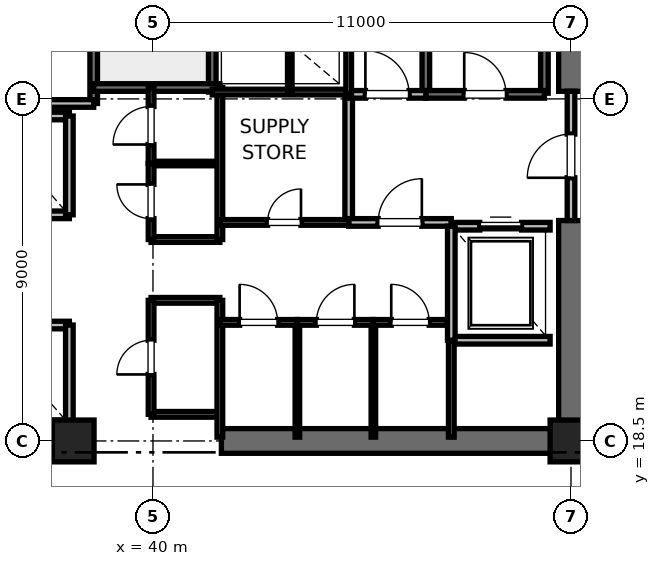
"""IFC4 building model, lengths in metres.
Left out: names, types, materials, properties, quantities, classifications, styles, units other than length and angle.
Written with IfcOpenShell. Run it as: python <this file> out.ifc"""

import sys

from ifc_helpers import new_model, si_unit, direction, frame, frame_2d, origin, origin_2d, place, context, subcontext, project, spatial, rectangle, extrude, element, fill, save


model = new_model("IFC4")
c1 = context("Model", 3, precision=1e-05, world=origin(), true_north=direction((0.0, 1.0)))
c2 = subcontext(c1, "Body", "Model", "MODEL_VIEW")
j1 = project(units=[si_unit("LENGTHUNIT", "METRE"), si_unit("PLANEANGLEUNIT", "RADIAN")], contexts=[c1])
p1 = place(None, origin())
s1 = spatial("IfcSite", under=j1, at=p1, CompositionType="ELEMENT")
p2 = place(p1, origin())
s2 = spatial("IfcBuilding", under=s1, at=p2, CompositionType="ELEMENT")
p3 = place(p2, frame((0.0, 0.0, 11.2)))
s3 = spatial("IfcBuildingStorey", under=s2, at=p3, CompositionType="ELEMENT", Elevation=11.2)
for number, where, z_axis, x_axis in (
    (1, (51.0, 18.5, 0.0), (0.0, 0.0, 1.0), (1.0, 0.0, 0.0)),
    (2, (37.9, 18.5, 0.0), (0.0, 0.0, 1.0), (1.0, 0.0, 0.0)),
):
    element("IfcColumn", number, at=place(p3, frame(where, z_axis=z_axis, x_axis=x_axis)), inside=s3, PredefinedType="PILASTER", context=c2, shape_type="SweptSolid", body=[
        extrude(rectangle(XDim=1.1, YDim=1.1, at=origin_2d()), origin(), (0.0, 0.0, 1.0), 5.2),
    ])
for number, where, z_axis, x_axis in (
    (3, (29.0, 18.5, 0.0), (0.0, 0.0, 1.0), (1.0, 0.0, 0.0)),
    (4, (41.8, 18.5, 0.0), (0.0, 0.0, 1.0), (1.0, 0.0, 0.0)),
):
    element("IfcWall", number, at=place(p3, frame(where, z_axis=z_axis, x_axis=x_axis)), inside=s3, PredefinedType="SHEAR", context=c2, shape_type="SweptSolid", body=[
        extrude(rectangle(XDim=9.2, YDim=0.65, at=frame_2d((4.6, 0.0))), origin(), (0.0, 0.0, 1.0), 4.92),
    ])
p4 = place(p3, frame((51.0, 18.5, 0.0), z_axis=(0.0, 0.0, 1.0), x_axis=(0.0, 1.0, 0.0)))
e5 = element("IfcWall", 5, at=p4, inside=s3, PredefinedType="SHEAR", context=c2, shape_type="SweptSolid", body=[
    extrude(rectangle(XDim=5.8, YDim=0.65, at=frame_2d((2.9, 0.0))), origin(), (0.0, 0.0, 1.0), 4.92),
])
p5 = place(p3, frame((51.0, 27.7, 0.0), z_axis=(0.0, 0.0, 1.0), x_axis=(0.0, 1.0, 0.0)))
e6 = element("IfcWall", 6, at=p5, inside=s3, PredefinedType="SHEAR", context=c2, shape_type="SweptSolid", body=[
    extrude(rectangle(XDim=8.8, YDim=0.65, at=frame_2d((4.4, 0.0))), origin(), (0.0, 0.0, 1.0), 4.92),
])
p6 = place(p3, frame((50.3, 27.65, 0.0), z_axis=(0.0, 0.0, 1.0), x_axis=(0.0, 1.0, 0.0)))
e7 = element("IfcWall", 7, at=p6, inside=s3, PredefinedType="SOLIDWALL", context=c2, shape_type="SweptSolid", body=[
    extrude(rectangle(XDim=8.15, YDim=0.2, at=frame_2d((4.075, 0.0))), origin(), (0.0, 0.0, 1.0), 4.92),
])
p7 = place(p3, frame((47.18, 27.62, 0.0), z_axis=(0.0, 0.0, 1.0), x_axis=(0.0, 1.0, 0.0)))
e8 = element("IfcWall", 8, at=p7, inside=s3, PredefinedType="SOLIDWALL", context=c2, shape_type="SweptSolid", body=[
    extrude(rectangle(XDim=8.18, YDim=0.2, at=frame_2d((4.09, 0.0))), origin(), (0.0, 0.0, 1.0), 4.92),
])
p8 = place(p3, frame((47.18, 27.62, 0.0), z_axis=(0.0, 0.0, 1.0), x_axis=(1.0, 0.0, 0.0)))
e9 = element("IfcWall", 9, at=p8, inside=s3, PredefinedType="SOLIDWALL", context=c2, shape_type="SweptSolid", body=[
    extrude(rectangle(XDim=3.12, YDim=0.2, at=frame_2d((1.56, 0.0))), origin(), (0.0, 0.0, 1.0), 4.92),
])
p9 = place(p8, frame((1.01, 0.0, 0.0)))
e10 = element("IfcOpeningElement", 10, at=p9, cuts=e9, PredefinedType="OPENING", context=c2, shape_type="SweptSolid", body=[
    extrude(rectangle(XDim=1.1, YDim=2.15, at=frame_2d((0.55, 1.075))), frame((0.0, 0.1, 0.0), z_axis=(0.0, -1.0, 0.0), x_axis=(1.0, 0.0, 0.0)), (0.0, 0.0, 1.0), 0.2),
])
p10 = place(p3, frame((38.44, 27.38, 0.0), z_axis=(0.0, 0.0, 1.0), x_axis=(0.0, 1.0, 0.0)))
e11 = element("IfcWall", 11, at=p10, inside=s3, PredefinedType="SOLIDWALL", context=c2, shape_type="SweptSolid", body=[
    extrude(rectangle(XDim=8.87, YDim=0.2, at=frame_2d((4.435, 0.0))), origin(), (0.0, 0.0, 1.0), 4.92),
])
p11 = place(p3, frame((41.56, 27.68, 0.0), z_axis=(0.0, 0.0, 1.0), x_axis=(0.0, 1.0, 0.0)))
e12 = element("IfcWall", 12, at=p11, inside=s3, PredefinedType="SOLIDWALL", context=c2, shape_type="SweptSolid", body=[
    extrude(rectangle(XDim=8.57, YDim=0.2, at=frame_2d((4.285, 0.0))), origin(), (0.0, 0.0, 1.0), 4.92),
])
p12 = place(p3, frame((38.44, 27.8, 0.0), z_axis=(0.0, 0.0, 1.0), x_axis=(1.0, 0.0, 0.0)))
e13 = element("IfcWall", 13, at=p12, inside=s3, PredefinedType="SOLIDWALL", context=c2, shape_type="SweptSolid", body=[
    extrude(rectangle(XDim=3.32, YDim=0.2, at=frame_2d((1.66, 0.0))), origin(), (0.0, 0.0, 1.0), 4.92),
])
p13 = place(p3, frame((32.82, 27.38, 0.0), z_axis=(0.0, 0.0, 1.0), x_axis=(1.0, 0.0, 0.0)))
e14 = element("IfcWall", 14, at=p13, inside=s3, PredefinedType="PARTITIONING", context=c2, shape_type="SweptSolid", body=[
    extrude(rectangle(XDim=5.62, YDim=0.2, at=frame_2d((2.81, 0.0))), origin(), (0.0, 0.0, 1.0), 4.92),
])
p14 = place(p3, frame((45.15, 24.25, 0.0), z_axis=(0.0, 0.0, 1.0), x_axis=(0.0, 1.0, 0.0)))
e15 = element("IfcWall", 15, at=p14, inside=s3, PredefinedType="PARTITIONING", context=c2, shape_type="SweptSolid", body=[
    extrude(rectangle(XDim=3.37, YDim=0.2, at=frame_2d((1.685, 0.0))), origin(), (0.0, 0.0, 1.0), 4.92),
])
p15 = place(p3, frame((45.15, 24.25, 0.0), z_axis=(0.0, 0.0, 1.0), x_axis=(1.0, 0.0, 0.0)))
e16 = element("IfcWall", 16, at=p15, inside=s3, PredefinedType="PARTITIONING", context=c2, shape_type="SweptSolid", body=[
    extrude(rectangle(XDim=2.7, YDim=0.2, at=frame_2d((1.35, 0.0))), origin(), (0.0, 0.0, 1.0), 4.92),
])
p16 = place(p15, frame((0.775, 0.0, 0.0)))
e17 = element("IfcOpeningElement", 17, at=p16, cuts=e16, PredefinedType="OPENING", context=c2, shape_type="SweptSolid", body=[
    extrude(rectangle(XDim=1.15, YDim=2.2, at=frame_2d((0.575, 1.1))), frame((0.0, 0.1, 0.0), z_axis=(0.0, -1.0, 0.0), x_axis=(1.0, 0.0, 0.0)), (0.0, 0.0, 1.0), 0.2),
])
p17 = place(p3, frame((45.15, 27.62, 0.0), z_axis=(0.0, 0.0, 1.0), x_axis=(1.0, 0.0, 0.0)))
e18 = element("IfcWall", 18, at=p17, inside=s3, PredefinedType="PARTITIONING", context=c2, shape_type="SweptSolid", body=[
    extrude(rectangle(XDim=2.03, YDim=0.2, at=frame_2d((1.015, 0.0))), origin(), (0.0, 0.0, 1.0), 4.92),
])
p18 = place(p17, frame((0.44, 0.0, 0.0)))
e19 = element("IfcOpeningElement", 19, at=p18, cuts=e18, PredefinedType="OPENING", context=c2, shape_type="SweptSolid", body=[
    extrude(rectangle(XDim=1.15, YDim=2.2, at=frame_2d((0.575, 1.1))), frame((0.0, 0.1, 0.0), z_axis=(0.0, -1.0, 0.0), x_axis=(1.0, 0.0, 0.0)), (0.0, 0.0, 1.0), 0.2),
])
p19 = place(p3, frame((51.0, 24.3, 0.0), z_axis=(0.0, 0.0, 1.0), x_axis=(0.0, 1.0, 0.0)))
e20 = element("IfcWall", 20, at=p19, inside=s3, PredefinedType="PARTITIONING", context=c2, shape_type="SweptSolid", body=[
    extrude(rectangle(XDim=3.4, YDim=0.2, at=frame_2d((1.7, 0.0))), origin(), (0.0, 0.0, 1.0), 3.7),
])
p20 = place(p19, frame((1.125, 0.0, 0.0)))
e21 = element("IfcOpeningElement", 21, at=p20, cuts=e20, PredefinedType="OPENING", context=c2, shape_type="SweptSolid", body=[
    extrude(rectangle(XDim=1.15, YDim=2.2, at=frame_2d((0.575, 1.1))), frame((0.0, 0.1, 0.0), z_axis=(0.0, -1.0, 0.0), x_axis=(1.0, 0.0, 0.0)), (0.0, 0.0, 1.0), 0.2),
])
p21 = place(p3, frame((47.85, 21.15, 0.0), z_axis=(0.0, 0.0, 1.0), x_axis=(1.0, 0.0, 0.0)))
e22 = element("IfcWall", 22, at=p21, inside=s3, PredefinedType="SOLIDWALL", context=c2, shape_type="SweptSolid", body=[
    extrude(rectangle(XDim=2.6, YDim=0.2, at=frame_2d((1.3, 0.0))), origin(), (0.0, 0.0, 1.0), 4.92),
])
p22 = place(p3, frame((50.45, 24.15, 0.0), z_axis=(0.0, 0.0, 1.0), x_axis=(-1.0, 0.0, 0.0)))
e23 = element("IfcWall", 23, at=p22, inside=s3, PredefinedType="SOLIDWALL", context=c2, shape_type="SweptSolid", body=[
    extrude(rectangle(XDim=2.6, YDim=0.2, at=frame_2d((1.3, 0.0))), origin(), (0.0, 0.0, 1.0), 3.7),
])
p23 = place(p22, frame((0.75, 0.0, 0.0)))
e24 = element("IfcOpeningElement", 24, at=p23, cuts=e23, PredefinedType="OPENING", context=c2, shape_type="SweptSolid", body=[
    extrude(rectangle(XDim=1.1, YDim=2.2, at=frame_2d((0.55, 1.1))), frame((0.0, 0.1, 0.0), z_axis=(0.0, -1.0, 0.0), x_axis=(1.0, 0.0, 0.0)), (0.0, 0.0, 1.0), 0.2),
])
p24 = place(p3, frame((47.85, 24.15, 0.0), z_axis=(0.0, 0.0, 1.0), x_axis=(0.0, -1.0, 0.0)))
e25 = element("IfcWall", 25, at=p24, inside=s3, PredefinedType="SOLIDWALL", context=c2, shape_type="SweptSolid", body=[
    extrude(rectangle(XDim=3.0, YDim=0.2, at=frame_2d((1.5, 0.0))), origin(), (0.0, 0.0, 1.0), 4.92),
])
p25 = place(p3, frame((35.5, 18.95, 0.0), z_axis=(0.0, 0.0, 1.0), x_axis=(1.0, 0.0, 0.0)))
e26 = element("IfcWall", 26, at=p25, inside=s3, PredefinedType="SOLIDWALL", context=c2, shape_type="SweptSolid", body=[
    extrude(rectangle(XDim=2.3, YDim=0.2, at=frame_2d((1.15, 0.0))), origin(), (0.0, 0.0, 1.0), 3.7),
])
p26 = place(p3, frame((37.8, 21.55, 0.0), z_axis=(0.0, 0.0, 1.0), x_axis=(-1.0, 0.0, 0.0)))
e27 = element("IfcWall", 27, at=p26, inside=s3, PredefinedType="SOLIDWALL", context=c2, shape_type="SweptSolid", body=[
    extrude(rectangle(XDim=2.3, YDim=0.2, at=frame_2d((1.15, 0.0))), origin(), (0.0, 0.0, 1.0), 4.92),
])
p27 = place(p3, frame((37.8, 18.95, 0.0), z_axis=(0.0, 0.0, 1.0), x_axis=(0.0, 1.0, 0.0)))
e28 = element("IfcWall", 28, at=p27, inside=s3, PredefinedType="SOLIDWALL", context=c2, shape_type="SweptSolid", body=[
    extrude(rectangle(XDim=2.6, YDim=0.2, at=frame_2d((1.3, 0.0))), origin(), (0.0, 0.0, 1.0), 3.7),
])
for number, where, z_axis, x_axis in (
    (29, (35.5, 24.45, 0.0), (0.0, 0.0, 1.0), (1.0, 0.0, 0.0)),
    (30, (37.8, 27.05, 0.0), (0.0, 0.0, 1.0), (-1.0, 0.0, 0.0)),
):
    element("IfcWall", number, at=place(p3, frame(where, z_axis=z_axis, x_axis=x_axis)), inside=s3, PredefinedType="SOLIDWALL", context=c2, shape_type="SweptSolid", body=[
        extrude(rectangle(XDim=2.3, YDim=0.2, at=frame_2d((1.15, 0.0))), origin(), (0.0, 0.0, 1.0), 4.92),
    ])
p28 = place(p3, frame((37.8, 24.45, 0.0), z_axis=(0.0, 0.0, 1.0), x_axis=(0.0, 1.0, 0.0)))
e31 = element("IfcWall", 31, at=p28, inside=s3, PredefinedType="SOLIDWALL", context=c2, shape_type="SweptSolid", body=[
    extrude(rectangle(XDim=2.6, YDim=0.2, at=frame_2d((1.3, 0.0))), origin(), (0.0, 0.0, 1.0), 4.92),
])
for number, where, z_axis, x_axis in (
    (32, (39.95, 19.2, 0.0), (0.0, 0.0, 1.0), (1.0, 0.0, 0.0)),
    (33, (39.95, 22.2, 0.0), (0.0, 0.0, 1.0), (1.0, 0.0, 0.0)),
    (34, (39.95, 23.8, 0.0), (0.0, 0.0, 1.0), (1.0, 0.0, 0.0)),
):
    element("IfcWall", number, at=place(p3, frame(where, z_axis=z_axis, x_axis=x_axis)), inside=s3, PredefinedType="PARTITIONING", context=c2, shape_type="SweptSolid", body=[
        extrude(rectangle(XDim=1.81, YDim=0.15, at=frame_2d((0.905, 0.0))), origin(), (0.0, 0.0, 1.0), 2.85),
    ])
p29 = place(p3, frame((39.95, 25.8, 0.0), z_axis=(0.0, 0.0, 1.0), x_axis=(1.0, 0.0, 0.0)))
e35 = element("IfcWall", 35, at=p29, inside=s3, PredefinedType="PARTITIONING", context=c2, shape_type="SweptSolid", body=[
    extrude(rectangle(XDim=1.81, YDim=0.12, at=frame_2d((0.905, 0.0))), origin(), (0.0, 0.0, 1.0), 2.85),
])
p30 = place(p3, frame((41.76, 18.6, 0.0), z_axis=(0.0, 0.0, 1.0), x_axis=(0.0, 1.0, 0.0)))
e36 = element("IfcWall", 36, at=p30, inside=s3, PredefinedType="PARTITIONING", context=c2, shape_type="SweptSolid", body=[
    extrude(rectangle(XDim=3.6, YDim=0.15, at=frame_2d((1.8, 0.0))), origin(), (0.0, 0.0, 1.0), 2.85),
])
p31 = place(p3, frame((41.76, 23.8, 0.0), z_axis=(0.0, 0.0, 1.0), x_axis=(0.0, 1.0, 0.0)))
e37 = element("IfcWall", 37, at=p31, inside=s3, PredefinedType="PARTITIONING", context=c2, shape_type="SweptSolid", body=[
    extrude(rectangle(XDim=4.0, YDim=0.15, at=frame_2d((2.0, 0.0))), origin(), (0.0, 0.0, 1.0), 2.85),
])
p32 = place(p3, frame((39.95, 19.2, 0.0), z_axis=(0.0, 0.0, 1.0), x_axis=(0.0, 1.0, 0.0)))
e38 = element("IfcWall", 38, at=p32, inside=s3, PredefinedType="PARTITIONING", context=c2, shape_type="SweptSolid", body=[
    extrude(rectangle(XDim=3.0, YDim=0.15, at=frame_2d((1.5, 0.0))), origin(), (0.0, 0.0, 1.0), 2.85),
])
p33 = place(p32, frame((1.05, 0.0, 0.0)))
e39 = element("IfcOpeningElement", 39, at=p33, cuts=e38, PredefinedType="OPENING", context=c2, shape_type="SweptSolid", body=[
    extrude(rectangle(XDim=0.9, YDim=2.1, at=frame_2d((0.45, 1.05))), frame((0.0, 0.075, 0.0), z_axis=(0.0, -1.0, 0.0), x_axis=(1.0, 0.0, 0.0)), (0.0, 0.0, 1.0), 0.15),
])
p34 = place(p3, frame((39.95, 23.8, 0.0), z_axis=(0.0, 0.0, 1.0), x_axis=(0.0, 1.0, 0.0)))
e40 = element("IfcWall", 40, at=p34, inside=s3, PredefinedType="PARTITIONING", context=c2, shape_type="SweptSolid", body=[
    extrude(rectangle(XDim=2.0, YDim=0.15, at=frame_2d((1.0, 0.0))), origin(), (0.0, 0.0, 1.0), 2.85),
])
p35 = place(p34, frame((0.55, 0.0, 0.0)))
e41 = element("IfcOpeningElement", 41, at=p35, cuts=e40, PredefinedType="OPENING", context=c2, shape_type="SweptSolid", body=[
    extrude(rectangle(XDim=0.9, YDim=2.1, at=frame_2d((0.45, 1.05))), frame((0.0, 0.075, 0.0), z_axis=(0.0, -1.0, 0.0), x_axis=(1.0, 0.0, 0.0)), (0.0, 0.0, 1.0), 0.15),
])
p36 = place(p3, frame((39.95, 25.8, 0.0), z_axis=(0.0, 0.0, 1.0), x_axis=(0.0, 1.0, 0.0)))
e42 = element("IfcWall", 42, at=p36, inside=s3, PredefinedType="PARTITIONING", context=c2, shape_type="SweptSolid", body=[
    extrude(rectangle(XDim=2.0, YDim=0.15, at=frame_2d((1.0, 0.0))), origin(), (0.0, 0.0, 1.0), 2.85),
])
p37 = place(p36, frame((0.5, 0.0, 0.0)))
e43 = element("IfcOpeningElement", 43, at=p37, cuts=e42, PredefinedType="OPENING", context=c2, shape_type="SweptSolid", body=[
    extrude(rectangle(XDim=1.0, YDim=2.15, at=frame_2d((0.5, 1.075))), frame((0.0, 0.075, 0.0), z_axis=(0.0, -1.0, 0.0), x_axis=(1.0, 0.0, 0.0)), (0.0, 0.0, 1.0), 0.15),
])
p38 = place(p3, frame((41.56, 27.68, 0.0), z_axis=(0.0, 0.0, 1.0), x_axis=(1.0, 0.0, 0.0)))
e44 = element("IfcWall", 44, at=p38, inside=s3, PredefinedType="PARTITIONING", context=c2, shape_type="SweptSolid", body=[
    extrude(rectangle(XDim=3.59, YDim=0.15, at=frame_2d((1.795, 0.0))), origin(), (0.0, 0.0, 1.0), 2.85),
])
p39 = place(p3, frame((47.85, 18.6, 0.0), z_axis=(0.0, 0.0, 1.0), x_axis=(0.0, 1.0, 0.0)))
e45 = element("IfcWall", 45, at=p39, inside=s3, PredefinedType="PARTITIONING", context=c2, shape_type="SweptSolid", body=[
    extrude(rectangle(XDim=2.54, YDim=0.15, at=frame_2d((1.27, 0.0))), origin(), (0.0, 0.0, 1.0), 2.85),
])
for number, where, z_axis, x_axis in (
    (46, (43.8, 18.6, 0.0), (0.0, 0.0, 1.0), (0.0, 1.0, 0.0)),
    (47, (45.8, 18.6, 0.0), (0.0, 0.0, 1.0), (0.0, 1.0, 0.0)),
):
    element("IfcWall", number, at=place(p3, frame(where, z_axis=z_axis, x_axis=x_axis)), inside=s3, PredefinedType="PARTITIONING", context=c2, shape_type="SweptSolid", body=[
        extrude(rectangle(XDim=3.02, YDim=0.12, at=frame_2d((1.51, 0.0))), origin(), (0.0, 0.0, 1.0), 2.85),
    ])
p40 = place(p3, frame((41.76, 21.62, 0.0), z_axis=(0.0, 0.0, 1.0), x_axis=(1.0, 0.0, 0.0)))
e48 = element("IfcWall", 48, at=p40, inside=s3, PredefinedType="PARTITIONING", context=c2, shape_type="SweptSolid", body=[
    extrude(rectangle(XDim=2.04, YDim=0.15, at=frame_2d((1.02, 0.0))), origin(), (0.0, 0.0, 1.0), 2.85),
])
p41 = place(p40, frame((0.52, 0.0, 0.0)))
e49 = element("IfcOpeningElement", 49, at=p41, cuts=e48, PredefinedType="OPENING", context=c2, shape_type="SweptSolid", body=[
    extrude(rectangle(XDim=1.0, YDim=2.15, at=frame_2d((0.5, 1.075))), frame((0.0, 0.075, 0.0), z_axis=(0.0, -1.0, 0.0), x_axis=(1.0, 0.0, 0.0)), (0.0, 0.0, 1.0), 0.15),
])
p42 = place(p3, frame((43.8, 21.62, 0.0), z_axis=(0.0, 0.0, 1.0), x_axis=(1.0, 0.0, 0.0)))
e50 = element("IfcWall", 50, at=p42, inside=s3, PredefinedType="PARTITIONING", context=c2, shape_type="SweptSolid", body=[
    extrude(rectangle(XDim=2.0, YDim=0.15, at=frame_2d((1.0, 0.0))), origin(), (0.0, 0.0, 1.0), 2.85),
])
p43 = place(p42, frame((0.5, 0.0, 0.0)))
e51 = element("IfcOpeningElement", 51, at=p43, cuts=e50, PredefinedType="OPENING", context=c2, shape_type="SweptSolid", body=[
    extrude(rectangle(XDim=1.0, YDim=2.15, at=frame_2d((0.5, 1.075))), frame((0.0, 0.075, 0.0), z_axis=(0.0, -1.0, 0.0), x_axis=(1.0, 0.0, 0.0)), (0.0, 0.0, 1.0), 0.15),
])
p44 = place(p3, frame((45.8, 21.62, 0.0), z_axis=(0.0, 0.0, 1.0), x_axis=(1.0, 0.0, 0.0)))
e52 = element("IfcWall", 52, at=p44, inside=s3, PredefinedType="PARTITIONING", context=c2, shape_type="SweptSolid", body=[
    extrude(rectangle(XDim=1.94, YDim=0.15, at=frame_2d((0.97, 0.0))), origin(), (0.0, 0.0, 1.0), 2.85),
])
p45 = place(p44, frame((0.47, 0.0, 0.0)))
e53 = element("IfcOpeningElement", 53, at=p45, cuts=e52, PredefinedType="OPENING", context=c2, shape_type="SweptSolid", body=[
    extrude(rectangle(XDim=1.0, YDim=2.15, at=frame_2d((0.5, 1.075))), frame((0.0, 0.075, 0.0), z_axis=(0.0, -1.0, 0.0), x_axis=(1.0, 0.0, 0.0)), (0.0, 0.0, 1.0), 0.15),
])
p46 = place(p3, frame((41.76, 24.25, 0.0), z_axis=(0.0, 0.0, 1.0), x_axis=(1.0, 0.0, 0.0)))
e54 = element("IfcWall", 54, at=p46, inside=s3, PredefinedType="PARTITIONING", context=c2, shape_type="SweptSolid", body=[
    extrude(rectangle(XDim=3.39, YDim=0.15, at=frame_2d((1.695, 0.0))), origin(), (0.0, 0.0, 1.0), 2.85),
])
p47 = place(p46, frame((1.255, 0.0, 0.0)))
e55 = element("IfcOpeningElement", 55, at=p47, cuts=e54, PredefinedType="OPENING", context=c2, shape_type="SweptSolid", body=[
    extrude(rectangle(XDim=0.88, YDim=2.1, at=frame_2d((0.44, 1.05))), frame((0.0, 0.075, 0.0), z_axis=(0.0, -1.0, 0.0), x_axis=(1.0, 0.0, 0.0)), (0.0, 0.0, 1.0), 0.15),
])
p48 = place(p3, frame((45.15, 27.62, 0.0), z_axis=(0.0, 0.0, 1.0), x_axis=(0.0, 1.0, 0.0)))
e56 = element("IfcWall", 56, at=p48, inside=s3, PredefinedType="PARTITIONING", context=c2, shape_type="SweptSolid", body=[
    extrude(rectangle(XDim=3.1, YDim=0.15, at=frame_2d((1.55, 0.0))), origin(), (0.0, 0.0, 1.0), 2.85),
])
p49 = place(p3, frame((43.6, 27.68, 0.0), z_axis=(0.0, 0.0, 1.0), x_axis=(0.0, 1.0, 0.0)))
e57 = element("IfcWall", 57, at=p49, inside=s3, PredefinedType="PARTITIONING", context=c2, shape_type="SweptSolid", body=[
    extrude(rectangle(XDim=3.04, YDim=0.12, at=frame_2d((1.52, 0.0))), origin(), (0.0, 0.0, 1.0), 2.85),
])
p50 = place(p9, origin())
e58 = element("IfcDoor", 58, at=p50, inside=s3, OperationType="SINGLE_SWING_LEFT", PredefinedType="DOOR", context=c2, shape_type="SweptSolid", body=[
    extrude(rectangle(XDim=1.1, YDim=2.15, at=frame_2d((0.55, 1.075))), frame((0.0, 0.025, 0.0), z_axis=(0.0, -1.0, 0.0), x_axis=(1.0, 0.0, 0.0)), (0.0, 0.0, 1.0), 0.05),
])
fill(e10, e58)
p51 = place(p16, origin())
e59 = element("IfcDoor", 59, at=p51, inside=s3, OperationType="SINGLE_SWING_RIGHT", PredefinedType="DOOR", context=c2, shape_type="SweptSolid", body=[
    extrude(rectangle(XDim=1.15, YDim=2.2, at=frame_2d((0.575, 1.1))), frame((0.0, 0.025, 0.0), z_axis=(0.0, -1.0, 0.0), x_axis=(1.0, 0.0, 0.0)), (0.0, 0.0, 1.0), 0.05),
])
fill(e17, e59)
p52 = place(p18, origin())
e60 = element("IfcDoor", 60, at=p52, inside=s3, OperationType="SINGLE_SWING_LEFT", PredefinedType="DOOR", context=c2, shape_type="SweptSolid", body=[
    extrude(rectangle(XDim=1.15, YDim=2.2, at=frame_2d((0.575, 1.1))), frame((0.0, 0.025, 0.0), z_axis=(0.0, -1.0, 0.0), x_axis=(1.0, 0.0, 0.0)), (0.0, 0.0, 1.0), 0.05),
])
fill(e19, e60)
p53 = place(p20, origin())
e61 = element("IfcDoor", 61, at=p53, inside=s3, OperationType="SINGLE_SWING_LEFT", PredefinedType="DOOR", context=c2, shape_type="SweptSolid", body=[
    extrude(rectangle(XDim=1.15, YDim=2.2, at=frame_2d((0.575, 1.1))), frame((0.0, 0.025, 0.0), z_axis=(0.0, -1.0, 0.0), x_axis=(1.0, 0.0, 0.0)), (0.0, 0.0, 1.0), 0.05),
])
fill(e21, e61)
p54 = place(p23, origin())
e62 = element("IfcDoor", 62, at=p54, inside=s3, OperationType="SLIDING_TO_RIGHT", PredefinedType="DOOR", context=c2, shape_type="SweptSolid", body=[
    extrude(rectangle(XDim=1.1, YDim=2.2, at=frame_2d((0.55, 1.1))), frame((0.0, 0.025, 0.0), z_axis=(0.0, -1.0, 0.0), x_axis=(1.0, 0.0, 0.0)), (0.0, 0.0, 1.0), 0.05),
])
fill(e24, e62)
p55 = place(p33, origin())
e63 = element("IfcDoor", 63, at=p55, inside=s3, OperationType="SINGLE_SWING_LEFT", PredefinedType="DOOR", context=c2, shape_type="SweptSolid", body=[
    extrude(rectangle(XDim=0.9, YDim=2.1, at=frame_2d((0.45, 1.05))), frame((0.0, 0.025, 0.0), z_axis=(0.0, -1.0, 0.0), x_axis=(1.0, 0.0, 0.0)), (0.0, 0.0, 1.0), 0.05),
])
fill(e39, e63)
p56 = place(p35, origin())
e64 = element("IfcDoor", 64, at=p56, inside=s3, OperationType="SINGLE_SWING_RIGHT", PredefinedType="DOOR", context=c2, shape_type="SweptSolid", body=[
    extrude(rectangle(XDim=0.9, YDim=2.1, at=frame_2d((0.45, 1.05))), frame((0.0, 0.025, 0.0), z_axis=(0.0, -1.0, 0.0), x_axis=(1.0, 0.0, 0.0)), (0.0, 0.0, 1.0), 0.05),
])
fill(e41, e64)
p57 = place(p37, origin())
e65 = element("IfcDoor", 65, at=p57, inside=s3, OperationType="SINGLE_SWING_LEFT", PredefinedType="DOOR", context=c2, shape_type="SweptSolid", body=[
    extrude(rectangle(XDim=1.0, YDim=2.15, at=frame_2d((0.5, 1.075))), frame((0.0, 0.025, 0.0), z_axis=(0.0, -1.0, 0.0), x_axis=(1.0, 0.0, 0.0)), (0.0, 0.0, 1.0), 0.05),
])
fill(e43, e65)
p58 = place(p41, origin())
e66 = element("IfcDoor", 66, at=p58, inside=s3, OperationType="SINGLE_SWING_LEFT", PredefinedType="DOOR", context=c2, shape_type="SweptSolid", body=[
    extrude(rectangle(XDim=1.0, YDim=2.15, at=frame_2d((0.5, 1.075))), frame((0.0, 0.025, 0.0), z_axis=(0.0, -1.0, 0.0), x_axis=(1.0, 0.0, 0.0)), (0.0, 0.0, 1.0), 0.05),
])
fill(e49, e66)
p59 = place(p43, origin())
e67 = element("IfcDoor", 67, at=p59, inside=s3, OperationType="SINGLE_SWING_RIGHT", PredefinedType="DOOR", context=c2, shape_type="SweptSolid", body=[
    extrude(rectangle(XDim=1.0, YDim=2.15, at=frame_2d((0.5, 1.075))), frame((0.0, 0.025, 0.0), z_axis=(0.0, -1.0, 0.0), x_axis=(1.0, 0.0, 0.0)), (0.0, 0.0, 1.0), 0.05),
])
fill(e51, e67)
p60 = place(p45, origin())
e68 = element("IfcDoor", 68, at=p60, inside=s3, OperationType="SINGLE_SWING_LEFT", PredefinedType="DOOR", context=c2, shape_type="SweptSolid", body=[
    extrude(rectangle(XDim=1.0, YDim=2.15, at=frame_2d((0.5, 1.075))), frame((0.0, 0.025, 0.0), z_axis=(0.0, -1.0, 0.0), x_axis=(1.0, 0.0, 0.0)), (0.0, 0.0, 1.0), 0.05),
])
fill(e53, e68)
p61 = place(p47, origin())
e69 = element("IfcDoor", 69, at=p61, inside=s3, OperationType="SINGLE_SWING_RIGHT", PredefinedType="DOOR", context=c2, shape_type="SweptSolid", body=[
    extrude(rectangle(XDim=0.88, YDim=2.1, at=frame_2d((0.44, 1.05))), frame((0.0, 0.025, 0.0), z_axis=(0.0, -1.0, 0.0), x_axis=(1.0, 0.0, 0.0)), (0.0, 0.0, 1.0), 0.05),
])
fill(e55, e69)
save(model, sys.argv[1])
